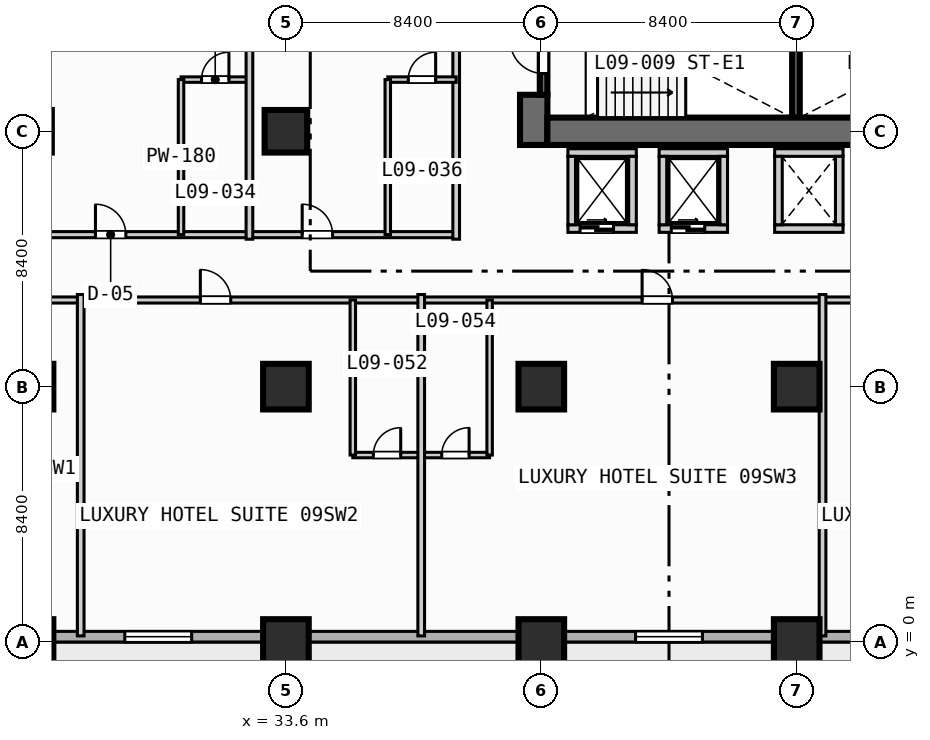
"""IFC4 building model, lengths in metres.
Left out: names, types, materials, properties, quantities, classifications, styles, units other than length and angle.
Written with IfcOpenShell. Run it as: python <this file> out.ifc"""

import sys

from ifc_helpers import new_model, si_unit, direction, frame, frame_2d, origin, origin_2d, place, context, subcontext, project, spatial, rectangle, extrude, element, fill, save


model = new_model("IFC4")
c1 = context("Model", 3, precision=1e-05, world=origin(), true_north=direction((0.0, 1.0)))
c2 = subcontext(c1, "Body", "Model", "MODEL_VIEW")
j1 = project(units=[si_unit("LENGTHUNIT", "METRE"), si_unit("PLANEANGLEUNIT", "RADIAN")], contexts=[c1])
p1 = place(None, origin())
s1 = spatial("IfcSite", under=j1, at=p1, CompositionType="ELEMENT")
p2 = place(p1, origin())
s2 = spatial("IfcBuilding", under=s1, at=p2, CompositionType="ELEMENT")
p3 = place(p2, frame((0.0, 0.0, 43.4)))
s3 = spatial("IfcBuildingStorey", under=s2, at=p3, CompositionType="ELEMENT", Elevation=43.4)
p4 = place(p3, frame((50.375, 17.25, 0.0), z_axis=(0.0, 0.0, 1.0), x_axis=(0.0, 1.0, 0.0)))
e1 = element("IfcWall", 1, at=p4, inside=s3, PredefinedType="SOLIDWALL", context=c2, shape_type="SweptSolid", body=[
    extrude(rectangle(XDim=3.5, YDim=0.25, at=frame_2d((1.75, 0.0))), origin(), (0.0, 0.0, 1.0), 3.55),
])
p5 = place(p3, frame((41.75, 16.35, 0.0), z_axis=(0.0, 0.0, 1.0), x_axis=(0.0, 1.0, 0.0)))
e2 = element("IfcWall", 2, at=p5, inside=s3, PredefinedType="SHEAR", context=c2, shape_type="SweptSolid", body=[
    extrude(rectangle(XDim=1.65, YDim=0.9, at=frame_2d((0.825, 0.0))), origin(), (0.0, 0.0, 1.0), 3.55),
])
p6 = place(p3, frame((42.2, 16.8, 0.0), z_axis=(0.0, 0.0, 1.0), x_axis=(1.0, 0.0, 0.0)))
e3 = element("IfcWall", 3, at=p6, inside=s3, PredefinedType="SHEAR", context=c2, shape_type="SweptSolid", body=[
    extrude(rectangle(XDim=16.35, YDim=0.9, at=frame_2d((8.175, 0.0))), origin(), (0.0, 0.0, 1.0), 3.55),
])
for number, where, z_axis, x_axis in (
    (4, (25.2, 0.0, 0.0), (0.0, 0.0, 1.0), (1.0, 0.0, 0.0)),
    (5, (25.2, 8.4, 0.0), (0.0, 0.0, 1.0), (1.0, 0.0, 0.0)),
    (6, (33.6, 0.0, 0.0), (0.0, 0.0, 1.0), (1.0, 0.0, 0.0)),
    (7, (33.6, 8.4, 0.0), (0.0, 0.0, 1.0), (1.0, 0.0, 0.0)),
):
    element("IfcColumn", number, at=place(p3, frame(where, z_axis=z_axis, x_axis=x_axis)), inside=s3, PredefinedType="COLUMN", context=c2, shape_type="SweptSolid", body=[
        extrude(rectangle(XDim=1.5, YDim=1.5, at=origin_2d()), origin(), (0.0, 0.0, 1.0), 3.8),
    ])
p7 = place(p3, frame((33.6, 16.8, 0.0), z_axis=(0.0, 0.0, 1.0), x_axis=(1.0, 0.0, 0.0)))
e8 = element("IfcColumn", 8, at=p7, inside=s3, PredefinedType="COLUMN", context=c2, shape_type="SweptSolid", body=[
    extrude(rectangle(XDim=1.4, YDim=1.4, at=origin_2d()), origin(), (0.0, 0.0, 1.0), 3.8),
])
for number, where, z_axis, x_axis in (
    (9, (42.0, 0.0, 0.0), (0.0, 0.0, 1.0), (1.0, 0.0, 0.0)),
    (10, (42.0, 8.4, 0.0), (0.0, 0.0, 1.0), (1.0, 0.0, 0.0)),
    (11, (50.4, 0.0, 0.0), (0.0, 0.0, 1.0), (1.0, 0.0, 0.0)),
    (12, (50.4, 8.4, 0.0), (0.0, 0.0, 1.0), (1.0, 0.0, 0.0)),
):
    element("IfcColumn", number, at=place(p3, frame(where, z_axis=z_axis, x_axis=x_axis)), inside=s3, PredefinedType="COLUMN", context=c2, shape_type="SweptSolid", body=[
        extrude(rectangle(XDim=1.5, YDim=1.5, at=origin_2d()), origin(), (0.0, 0.0, 1.0), 3.8),
    ])
p8 = place(p3, frame((89.225, 0.175, 0.0), z_axis=(0.0, 0.0, 1.0), x_axis=(-1.0, 0.0, 0.0)))
e13 = element("IfcWall", 13, at=p8, inside=s3, PredefinedType="STANDARD", context=c2, shape_type="SweptSolid", body=[
    extrude(rectangle(XDim=86.05, YDim=0.35, at=frame_2d((43.025, 0.0))), origin(), (0.0, 0.0, 1.0), 3.55),
])
p9 = place(p8, frame((67.525, 0.0, 0.0)))
e14 = element("IfcOpeningElement", 14, at=p9, cuts=e13, PredefinedType="OPENING", context=c2, shape_type="SweptSolid", body=[
    extrude(rectangle(XDim=1.4, YDim=2.2, at=frame_2d((0.7, 1.1))), frame((0.0, 0.185, 0.0), z_axis=(0.0, -1.0, 0.0), x_axis=(1.0, 0.0, 0.0)), (0.0, 0.0, 1.0), 0.37),
])
p10 = place(p8, frame((58.725, 0.0, 0.85)))
e15 = element("IfcOpeningElement", 15, at=p10, cuts=e13, PredefinedType="OPENING", context=c2, shape_type="SweptSolid", body=[
    extrude(rectangle(XDim=2.2, YDim=1.8, at=frame_2d((1.1, 0.9))), frame((0.0, 0.185, 0.0), z_axis=(0.0, -1.0, 0.0), x_axis=(1.0, 0.0, 0.0)), (0.0, 0.0, 1.0), 0.37),
])
p11 = place(p8, frame((41.925, 0.0, 0.85)))
e16 = element("IfcOpeningElement", 16, at=p11, cuts=e13, PredefinedType="OPENING", context=c2, shape_type="SweptSolid", body=[
    extrude(rectangle(XDim=2.2, YDim=1.8, at=frame_2d((1.1, 0.9))), frame((0.0, 0.185, 0.0), z_axis=(0.0, -1.0, 0.0), x_axis=(1.0, 0.0, 0.0)), (0.0, 0.0, 1.0), 0.37),
])
p12 = place(p8, frame((33.525, 0.0, 0.85)))
e17 = element("IfcOpeningElement", 17, at=p12, cuts=e13, PredefinedType="OPENING", context=c2, shape_type="SweptSolid", body=[
    extrude(rectangle(XDim=2.2, YDim=1.8, at=frame_2d((1.1, 0.9))), frame((0.0, 0.185, 0.0), z_axis=(0.0, -1.0, 0.0), x_axis=(1.0, 0.0, 0.0)), (0.0, 0.0, 1.0), 0.37),
])
p13 = place(p8, frame((16.725, 0.0, 0.85)))
e18 = element("IfcOpeningElement", 18, at=p13, cuts=e13, PredefinedType="OPENING", context=c2, shape_type="SweptSolid", body=[
    extrude(rectangle(XDim=2.2, YDim=1.8, at=frame_2d((1.1, 0.9))), frame((0.0, 0.185, 0.0), z_axis=(0.0, -1.0, 0.0), x_axis=(1.0, 0.0, 0.0)), (0.0, 0.0, 1.0), 0.37),
])
p14 = place(p8, frame((8.325, 0.0, 0.85)))
e19 = element("IfcOpeningElement", 19, at=p14, cuts=e13, PredefinedType="OPENING", context=c2, shape_type="SweptSolid", body=[
    extrude(rectangle(XDim=2.2, YDim=1.8, at=frame_2d((1.1, 0.9))), frame((0.0, 0.185, 0.0), z_axis=(0.0, -1.0, 0.0), x_axis=(1.0, 0.0, 0.0)), (0.0, 0.0, 1.0), 0.37),
])
p15 = place(p3, frame((42.075, 18.0, 0.0), z_axis=(0.0, 0.0, 1.0), x_axis=(0.0, 1.0, 0.0)))
e20 = element("IfcWall", 20, at=p15, inside=s3, PredefinedType="SOLIDWALL", context=c2, shape_type="SweptSolid", body=[
    extrude(rectangle(XDim=2.5, YDim=0.25, at=frame_2d((1.25, 0.0))), origin(), (0.0, 0.0, 1.0), 3.55),
])
p16 = place(p15, frame((0.7, 0.0, 0.0)))
e21 = element("IfcOpeningElement", 21, at=p16, cuts=e20, PredefinedType="OPENING", context=c2, shape_type="SweptSolid", body=[
    extrude(rectangle(XDim=1.1, YDim=2.15, at=frame_2d((0.55, 1.075))), frame((0.0, 0.135, 0.0), z_axis=(0.0, -1.0, 0.0), x_axis=(1.0, 0.0, 0.0)), (0.0, 0.0, 1.0), 0.27),
])
p17 = place(p3, frame((42.875, 13.6, 0.0), z_axis=(0.0, 0.0, 1.0), x_axis=(1.0, 0.0, 0.0)))
e22 = element("IfcWall", 22, at=p17, inside=s3, PredefinedType="SOLIDWALL", context=c2, shape_type="SweptSolid", body=[
    extrude(rectangle(XDim=2.25, YDim=0.25, at=frame_2d((1.125, 0.0))), origin(), (0.0, 0.0, 1.0), 3.55),
])
p18 = place(p17, frame((0.4, 0.0, 0.0)))
e23 = element("IfcOpeningElement", 23, at=p18, cuts=e22, PredefinedType="OPENING", context=c2, shape_type="SweptSolid", body=[
    extrude(rectangle(XDim=1.1, YDim=2.15, at=frame_2d((0.55, 1.075))), frame((0.0, 0.135, 0.0), z_axis=(0.0, -1.0, 0.0), x_axis=(1.0, 0.0, 0.0)), (0.0, 0.0, 1.0), 0.27),
])
for number, where, z_axis, x_axis in (
    (24, (42.875, 16.1, 0.0), (0.0, 0.0, 1.0), (1.0, 0.0, 0.0)),
    (25, (43.0, 13.725, 0.0), (0.0, 0.0, 1.0), (0.0, 1.0, 0.0)),
    (26, (45.0, 13.725, 0.0), (0.0, 0.0, 1.0), (0.0, 1.0, 0.0)),
):
    element("IfcWall", number, at=place(p3, frame(where, z_axis=z_axis, x_axis=x_axis)), inside=s3, PredefinedType="SOLIDWALL", context=c2, shape_type="SweptSolid", body=[
        extrude(rectangle(XDim=2.25, YDim=0.25, at=frame_2d((1.125, 0.0))), origin(), (0.0, 0.0, 1.0), 3.55),
    ])
p19 = place(p3, frame((45.875, 13.6, 0.0), z_axis=(0.0, 0.0, 1.0), x_axis=(1.0, 0.0, 0.0)))
e27 = element("IfcWall", 27, at=p19, inside=s3, PredefinedType="SOLIDWALL", context=c2, shape_type="SweptSolid", body=[
    extrude(rectangle(XDim=2.25, YDim=0.25, at=frame_2d((1.125, 0.0))), origin(), (0.0, 0.0, 1.0), 3.55),
])
p20 = place(p19, frame((0.4, 0.0, 0.0)))
e28 = element("IfcOpeningElement", 28, at=p20, cuts=e27, PredefinedType="OPENING", context=c2, shape_type="SweptSolid", body=[
    extrude(rectangle(XDim=1.1, YDim=2.15, at=frame_2d((0.55, 1.075))), frame((0.0, 0.135, 0.0), z_axis=(0.0, -1.0, 0.0), x_axis=(1.0, 0.0, 0.0)), (0.0, 0.0, 1.0), 0.27),
])
for number, where, z_axis, x_axis in (
    (29, (45.875, 16.1, 0.0), (0.0, 0.0, 1.0), (1.0, 0.0, 0.0)),
    (30, (46.0, 13.725, 0.0), (0.0, 0.0, 1.0), (0.0, 1.0, 0.0)),
    (31, (48.0, 13.725, 0.0), (0.0, 0.0, 1.0), (0.0, 1.0, 0.0)),
    (32, (49.675, 13.6, 0.0), (0.0, 0.0, 1.0), (1.0, 0.0, 0.0)),
    (33, (49.675, 16.1, 0.0), (0.0, 0.0, 1.0), (1.0, 0.0, 0.0)),
    (34, (49.8, 13.725, 0.0), (0.0, 0.0, 1.0), (0.0, 1.0, 0.0)),
    (35, (51.8, 13.725, 0.0), (0.0, 0.0, 1.0), (0.0, 1.0, 0.0)),
):
    element("IfcWall", number, at=place(p3, frame(where, z_axis=z_axis, x_axis=x_axis)), inside=s3, PredefinedType="SOLIDWALL", context=c2, shape_type="SweptSolid", body=[
        extrude(rectangle(XDim=2.25, YDim=0.25, at=frame_2d((1.125, 0.0))), origin(), (0.0, 0.0, 1.0), 3.55),
    ])
p21 = place(p3, frame((25.6, 13.4, 0.0), z_axis=(0.0, 0.0, 1.0), x_axis=(1.0, 0.0, 0.0)))
e36 = element("IfcWall", 36, at=p21, inside=s3, PredefinedType="PARTITIONING", context=c2, shape_type="SweptSolid", body=[
    extrude(rectangle(XDim=13.6, YDim=0.2, at=frame_2d((6.8, 0.0))), origin(), (0.0, 0.0, 1.0), 3.55),
])
p22 = place(p21, frame((1.735, 0.0, 0.0)))
e37 = element("IfcOpeningElement", 37, at=p22, cuts=e36, PredefinedType="OPENING", context=c2, shape_type="SweptSolid", body=[
    extrude(rectangle(XDim=1.0, YDim=2.15, at=frame_2d((0.5, 1.075))), frame((0.0, 0.11, 0.0), z_axis=(0.0, -1.0, 0.0), x_axis=(1.0, 0.0, 0.0)), (0.0, 0.0, 1.0), 0.22),
])
p23 = place(p21, frame((8.535, 0.0, 0.0)))
e38 = element("IfcOpeningElement", 38, at=p23, cuts=e36, PredefinedType="OPENING", context=c2, shape_type="SweptSolid", body=[
    extrude(rectangle(XDim=1.0, YDim=2.15, at=frame_2d((0.5, 1.075))), frame((0.0, 0.11, 0.0), z_axis=(0.0, -1.0, 0.0), x_axis=(1.0, 0.0, 0.0)), (0.0, 0.0, 1.0), 0.22),
])
p24 = place(p3, frame((30.15, 18.5, 0.0), z_axis=(0.0, 0.0, 1.0), x_axis=(1.0, 0.0, 0.0)))
e39 = element("IfcWall", 39, at=p24, inside=s3, PredefinedType="PLUMBINGWALL", context=c2, shape_type="SweptSolid", body=[
    extrude(rectangle(XDim=2.25, YDim=0.18, at=frame_2d((1.125, 0.0))), origin(), (0.0, 0.0, 1.0), 3.55),
])
p25 = place(p24, frame((0.675, 0.0, 0.0)))
e40 = element("IfcOpeningElement", 40, at=p25, cuts=e39, PredefinedType="OPENING", context=c2, shape_type="SweptSolid", body=[
    extrude(rectangle(XDim=0.9, YDim=2.1, at=frame_2d((0.45, 1.05))), frame((0.0, 0.1, 0.0), z_axis=(0.0, -1.0, 0.0), x_axis=(1.0, 0.0, 0.0)), (0.0, 0.0, 1.0), 0.2),
])
p26 = place(p3, frame((30.15, 13.4, 0.0), z_axis=(0.0, 0.0, 1.0), x_axis=(0.0, 1.0, 0.0)))
e41 = element("IfcWall", 41, at=p26, inside=s3, PredefinedType="PLUMBINGWALL", context=c2, shape_type="SweptSolid", body=[
    extrude(rectangle(XDim=5.1, YDim=0.18, at=frame_2d((2.55, 0.0))), origin(), (0.0, 0.0, 1.0), 3.55),
])
for number, where, z_axis, x_axis in (
    (42, (32.4, 13.25, 0.0), (0.0, 0.0, 1.0), (0.0, 1.0, 0.0)),
    (43, (39.2, 13.25, 0.0), (0.0, 0.0, 1.0), (0.0, 1.0, 0.0)),
):
    element("IfcWall", number, at=place(p3, frame(where, z_axis=z_axis, x_axis=x_axis)), inside=s3, PredefinedType="PARTITIONING", context=c2, shape_type="SweptSolid", body=[
        extrude(rectangle(XDim=20.18, YDim=0.22, at=frame_2d((10.09, 0.0))), origin(), (0.0, 0.0, 1.0), 3.55),
    ])
p27 = place(p3, frame((36.95, 18.5, 0.0), z_axis=(0.0, 0.0, 1.0), x_axis=(1.0, 0.0, 0.0)))
e44 = element("IfcWall", 44, at=p27, inside=s3, PredefinedType="PLUMBINGWALL", context=c2, shape_type="SweptSolid", body=[
    extrude(rectangle(XDim=2.25, YDim=0.18, at=frame_2d((1.125, 0.0))), origin(), (0.0, 0.0, 1.0), 3.55),
])
p28 = place(p27, frame((0.675, 0.0, 0.0)))
e45 = element("IfcOpeningElement", 45, at=p28, cuts=e44, PredefinedType="OPENING", context=c2, shape_type="SweptSolid", body=[
    extrude(rectangle(XDim=0.9, YDim=2.1, at=frame_2d((0.45, 1.05))), frame((0.0, 0.1, 0.0), z_axis=(0.0, -1.0, 0.0), x_axis=(1.0, 0.0, 0.0)), (0.0, 0.0, 1.0), 0.2),
])
p29 = place(p3, frame((36.95, 13.4, 0.0), z_axis=(0.0, 0.0, 1.0), x_axis=(0.0, 1.0, 0.0)))
e46 = element("IfcWall", 46, at=p29, inside=s3, PredefinedType="PLUMBINGWALL", context=c2, shape_type="SweptSolid", body=[
    extrude(rectangle(XDim=5.1, YDim=0.18, at=frame_2d((2.55, 0.0))), origin(), (0.0, 0.0, 1.0), 3.55),
])
p30 = place(p3, frame((13.65, 11.25, 0.0), z_axis=(0.0, 0.0, 1.0), x_axis=(1.0, 0.0, 0.0)))
e47 = element("IfcWall", 47, at=p30, inside=s3, PredefinedType="PARTITIONING", context=c2, shape_type="SweptSolid", body=[
    extrude(rectangle(XDim=75.15, YDim=0.2, at=frame_2d((37.575, 0.0))), origin(), (0.0, 0.0, 1.0), 3.55),
])
p31 = place(p30, frame((7.265, 0.0, 0.0)))
e48 = element("IfcOpeningElement", 48, at=p31, cuts=e47, PredefinedType="OPENING", context=c2, shape_type="SweptSolid", body=[
    extrude(rectangle(XDim=1.0, YDim=2.15, at=frame_2d((0.5, 1.075))), frame((0.0, 0.11, 0.0), z_axis=(0.0, -1.0, 0.0), x_axis=(1.0, 0.0, 0.0)), (0.0, 0.0, 1.0), 0.22),
])
p32 = place(p30, frame((17.135, 0.0, 0.0)))
e49 = element("IfcOpeningElement", 49, at=p32, cuts=e47, PredefinedType="OPENING", context=c2, shape_type="SweptSolid", body=[
    extrude(rectangle(XDim=1.0, YDim=2.15, at=frame_2d((0.5, 1.075))), frame((0.0, 0.11, 0.0), z_axis=(0.0, -1.0, 0.0), x_axis=(1.0, 0.0, 0.0)), (0.0, 0.0, 1.0), 0.22),
])
p33 = place(p30, frame((31.665, 0.0, 0.0)))
e50 = element("IfcOpeningElement", 50, at=p33, cuts=e47, PredefinedType="OPENING", context=c2, shape_type="SweptSolid", body=[
    extrude(rectangle(XDim=1.0, YDim=2.15, at=frame_2d((0.5, 1.075))), frame((0.0, 0.11, 0.0), z_axis=(0.0, -1.0, 0.0), x_axis=(1.0, 0.0, 0.0)), (0.0, 0.0, 1.0), 0.22),
])
p34 = place(p30, frame((41.535, 0.0, 0.0)))
e51 = element("IfcOpeningElement", 51, at=p34, cuts=e47, PredefinedType="OPENING", context=c2, shape_type="SweptSolid", body=[
    extrude(rectangle(XDim=1.0, YDim=2.15, at=frame_2d((0.5, 1.075))), frame((0.0, 0.11, 0.0), z_axis=(0.0, -1.0, 0.0), x_axis=(1.0, 0.0, 0.0)), (0.0, 0.0, 1.0), 0.22),
])
p35 = place(p30, frame((56.065, 0.0, 0.0)))
e52 = element("IfcOpeningElement", 52, at=p35, cuts=e47, PredefinedType="OPENING", context=c2, shape_type="SweptSolid", body=[
    extrude(rectangle(XDim=1.0, YDim=2.15, at=frame_2d((0.5, 1.075))), frame((0.0, 0.11, 0.0), z_axis=(0.0, -1.0, 0.0), x_axis=(1.0, 0.0, 0.0)), (0.0, 0.0, 1.0), 0.22),
])
p36 = place(p30, frame((66.91, 0.0, 0.0)))
e53 = element("IfcOpeningElement", 53, at=p36, cuts=e47, PredefinedType="OPENING", context=c2, shape_type="SweptSolid", body=[
    extrude(rectangle(XDim=1.0, YDim=2.15, at=frame_2d((0.5, 1.075))), frame((0.0, 0.11, 0.0), z_axis=(0.0, -1.0, 0.0), x_axis=(1.0, 0.0, 0.0)), (0.0, 0.0, 1.0), 0.22),
])
p37 = place(p3, frame((26.85, 0.2, 0.0), z_axis=(0.0, 0.0, 1.0), x_axis=(0.0, 1.0, 0.0)))
e54 = element("IfcWall", 54, at=p37, inside=s3, PredefinedType="PARTITIONING", context=c2, shape_type="SweptSolid", body=[
    extrude(rectangle(XDim=11.23, YDim=0.22, at=frame_2d((5.615, 0.0))), origin(), (0.0, 0.0, 1.0), 3.55),
])
p38 = place(p3, frame((35.8, 6.15, 0.0), z_axis=(0.0, 0.0, 1.0), x_axis=(1.0, 0.0, 0.0)))
e55 = element("IfcWall", 55, at=p38, inside=s3, PredefinedType="PLUMBINGWALL", context=c2, shape_type="SweptSolid", body=[
    extrude(rectangle(XDim=4.5, YDim=0.18, at=frame_2d((2.25, 0.0))), origin(), (0.0, 0.0, 1.0), 3.55),
])
p39 = place(p38, frame((0.675, 0.0, 0.0)))
e56 = element("IfcOpeningElement", 56, at=p39, cuts=e55, PredefinedType="OPENING", context=c2, shape_type="SweptSolid", body=[
    extrude(rectangle(XDim=0.9, YDim=2.1, at=frame_2d((0.45, 1.05))), frame((0.0, 0.1, 0.0), z_axis=(0.0, -1.0, 0.0), x_axis=(1.0, 0.0, 0.0)), (0.0, 0.0, 1.0), 0.2),
])
p40 = place(p38, frame((2.925, 0.0, 0.0)))
e57 = element("IfcOpeningElement", 57, at=p40, cuts=e55, PredefinedType="OPENING", context=c2, shape_type="SweptSolid", body=[
    extrude(rectangle(XDim=0.9, YDim=2.1, at=frame_2d((0.45, 1.05))), frame((0.0, 0.1, 0.0), z_axis=(0.0, -1.0, 0.0), x_axis=(1.0, 0.0, 0.0)), (0.0, 0.0, 1.0), 0.2),
])
p41 = place(p3, frame((35.8, 6.15, 0.0), z_axis=(0.0, 0.0, 1.0), x_axis=(0.0, 1.0, 0.0)))
e58 = element("IfcWall", 58, at=p41, inside=s3, PredefinedType="PLUMBINGWALL", context=c2, shape_type="SweptSolid", body=[
    extrude(rectangle(XDim=5.1, YDim=0.18, at=frame_2d((2.55, 0.0))), origin(), (0.0, 0.0, 1.0), 3.55),
])
p42 = place(p3, frame((38.05, 0.2, 0.0), z_axis=(0.0, 0.0, 1.0), x_axis=(0.0, 1.0, 0.0)))
e59 = element("IfcWall", 59, at=p42, inside=s3, PredefinedType="PARTITIONING", context=c2, shape_type="SweptSolid", body=[
    extrude(rectangle(XDim=11.23, YDim=0.22, at=frame_2d((5.615, 0.0))), origin(), (0.0, 0.0, 1.0), 3.55),
])
p43 = place(p3, frame((40.3, 6.15, 0.0), z_axis=(0.0, 0.0, 1.0), x_axis=(0.0, 1.0, 0.0)))
e60 = element("IfcWall", 60, at=p43, inside=s3, PredefinedType="PLUMBINGWALL", context=c2, shape_type="SweptSolid", body=[
    extrude(rectangle(XDim=5.1, YDim=0.18, at=frame_2d((2.55, 0.0))), origin(), (0.0, 0.0, 1.0), 3.55),
])
p44 = place(p3, frame((51.25, 0.2, 0.0), z_axis=(0.0, 0.0, 1.0), x_axis=(0.0, 1.0, 0.0)))
e61 = element("IfcWall", 61, at=p44, inside=s3, PredefinedType="PARTITIONING", context=c2, shape_type="SweptSolid", body=[
    extrude(rectangle(XDim=11.23, YDim=0.22, at=frame_2d((5.615, 0.0))), origin(), (0.0, 0.0, 1.0), 3.55),
])
p45 = place(p10, origin())
e62 = element("IfcWindow", 62, at=p45, inside=s3, PartitioningType="SINGLE_PANEL", PredefinedType="WINDOW", context=c2, shape_type="SweptSolid", body=[
    extrude(rectangle(XDim=2.2, YDim=1.8, at=frame_2d((1.1, 0.9))), frame((0.0, 0.03, 0.0), z_axis=(0.0, -1.0, 0.0), x_axis=(1.0, 0.0, 0.0)), (0.0, 0.0, 1.0), 0.06),
])
fill(e15, e62)
p46 = place(p11, origin())
e63 = element("IfcWindow", 63, at=p46, inside=s3, PartitioningType="SINGLE_PANEL", PredefinedType="WINDOW", context=c2, shape_type="SweptSolid", body=[
    extrude(rectangle(XDim=2.2, YDim=1.8, at=frame_2d((1.1, 0.9))), frame((0.0, 0.03, 0.0), z_axis=(0.0, -1.0, 0.0), x_axis=(1.0, 0.0, 0.0)), (0.0, 0.0, 1.0), 0.06),
])
fill(e16, e63)
p47 = place(p16, origin())
e64 = element("IfcDoor", 64, at=p47, inside=s3, OperationType="SINGLE_SWING_RIGHT", PredefinedType="DOOR", context=c2, shape_type="SweptSolid", body=[
    extrude(rectangle(XDim=1.1, YDim=2.15, at=frame_2d((0.55, 1.075))), frame((0.0, 0.025, 0.0), z_axis=(0.0, -1.0, 0.0), x_axis=(1.0, 0.0, 0.0)), (0.0, 0.0, 1.0), 0.05),
])
fill(e21, e64)
p48 = place(p18, origin())
e65 = element("IfcDoor", 65, at=p48, inside=s3, OperationType="SLIDING_TO_LEFT", PredefinedType="DOOR", context=c2, shape_type="SweptSolid", body=[
    extrude(rectangle(XDim=1.1, YDim=2.15, at=frame_2d((0.55, 1.075))), frame((0.0, 0.025, 0.0), z_axis=(0.0, -1.0, 0.0), x_axis=(1.0, 0.0, 0.0)), (0.0, 0.0, 1.0), 0.05),
])
fill(e23, e65)
p49 = place(p20, origin())
e66 = element("IfcDoor", 66, at=p49, inside=s3, OperationType="SLIDING_TO_LEFT", PredefinedType="DOOR", context=c2, shape_type="SweptSolid", body=[
    extrude(rectangle(XDim=1.1, YDim=2.15, at=frame_2d((0.55, 1.075))), frame((0.0, 0.025, 0.0), z_axis=(0.0, -1.0, 0.0), x_axis=(1.0, 0.0, 0.0)), (0.0, 0.0, 1.0), 0.05),
])
fill(e28, e66)
p50 = place(p22, origin())
e67 = element("IfcDoor", 67, at=p50, inside=s3, OperationType="SINGLE_SWING_LEFT", PredefinedType="DOOR", context=c2, shape_type="SweptSolid", body=[
    extrude(rectangle(XDim=1.0, YDim=2.15, at=frame_2d((0.5, 1.075))), frame((0.0, 0.025, 0.0), z_axis=(0.0, -1.0, 0.0), x_axis=(1.0, 0.0, 0.0)), (0.0, 0.0, 1.0), 0.05),
])
fill(e37, e67)
p51 = place(p23, origin())
e68 = element("IfcDoor", 68, at=p51, inside=s3, OperationType="SINGLE_SWING_LEFT", PredefinedType="DOOR", context=c2, shape_type="SweptSolid", body=[
    extrude(rectangle(XDim=1.0, YDim=2.15, at=frame_2d((0.5, 1.075))), frame((0.0, 0.025, 0.0), z_axis=(0.0, -1.0, 0.0), x_axis=(1.0, 0.0, 0.0)), (0.0, 0.0, 1.0), 0.05),
])
fill(e38, e68)
p52 = place(p25, origin())
e69 = element("IfcDoor", 69, at=p52, inside=s3, OperationType="SINGLE_SWING_RIGHT", PredefinedType="DOOR", context=c2, shape_type="SweptSolid", body=[
    extrude(rectangle(XDim=0.9, YDim=2.1, at=frame_2d((0.45, 1.05))), frame((0.0, 0.025, 0.0), z_axis=(0.0, -1.0, 0.0), x_axis=(1.0, 0.0, 0.0)), (0.0, 0.0, 1.0), 0.05),
])
fill(e40, e69)
p53 = place(p28, origin())
e70 = element("IfcDoor", 70, at=p53, inside=s3, OperationType="SINGLE_SWING_RIGHT", PredefinedType="DOOR", context=c2, shape_type="SweptSolid", body=[
    extrude(rectangle(XDim=0.9, YDim=2.1, at=frame_2d((0.45, 1.05))), frame((0.0, 0.025, 0.0), z_axis=(0.0, -1.0, 0.0), x_axis=(1.0, 0.0, 0.0)), (0.0, 0.0, 1.0), 0.05),
])
fill(e45, e70)
p54 = place(p32, origin())
e71 = element("IfcDoor", 71, at=p54, inside=s3, OperationType="SINGLE_SWING_LEFT", PredefinedType="DOOR", context=c2, shape_type="SweptSolid", body=[
    extrude(rectangle(XDim=1.0, YDim=2.15, at=frame_2d((0.5, 1.075))), frame((0.0, 0.025, 0.0), z_axis=(0.0, -1.0, 0.0), x_axis=(1.0, 0.0, 0.0)), (0.0, 0.0, 1.0), 0.05),
])
fill(e49, e71)
p55 = place(p33, origin())
e72 = element("IfcDoor", 72, at=p55, inside=s3, OperationType="SINGLE_SWING_LEFT", PredefinedType="DOOR", context=c2, shape_type="SweptSolid", body=[
    extrude(rectangle(XDim=1.0, YDim=2.15, at=frame_2d((0.5, 1.075))), frame((0.0, 0.025, 0.0), z_axis=(0.0, -1.0, 0.0), x_axis=(1.0, 0.0, 0.0)), (0.0, 0.0, 1.0), 0.05),
])
fill(e50, e72)
p56 = place(p39, origin())
e73 = element("IfcDoor", 73, at=p56, inside=s3, OperationType="SINGLE_SWING_RIGHT", PredefinedType="DOOR", context=c2, shape_type="SweptSolid", body=[
    extrude(rectangle(XDim=0.9, YDim=2.1, at=frame_2d((0.45, 1.05))), frame((0.0, 0.025, 0.0), z_axis=(0.0, -1.0, 0.0), x_axis=(1.0, 0.0, 0.0)), (0.0, 0.0, 1.0), 0.05),
])
fill(e56, e73)
p57 = place(p40, origin())
e74 = element("IfcDoor", 74, at=p57, inside=s3, OperationType="SINGLE_SWING_RIGHT", PredefinedType="DOOR", context=c2, shape_type="SweptSolid", body=[
    extrude(rectangle(XDim=0.9, YDim=2.1, at=frame_2d((0.45, 1.05))), frame((0.0, 0.025, 0.0), z_axis=(0.0, -1.0, 0.0), x_axis=(1.0, 0.0, 0.0)), (0.0, 0.0, 1.0), 0.05),
])
fill(e57, e74)
save(model, sys.argv[1])
